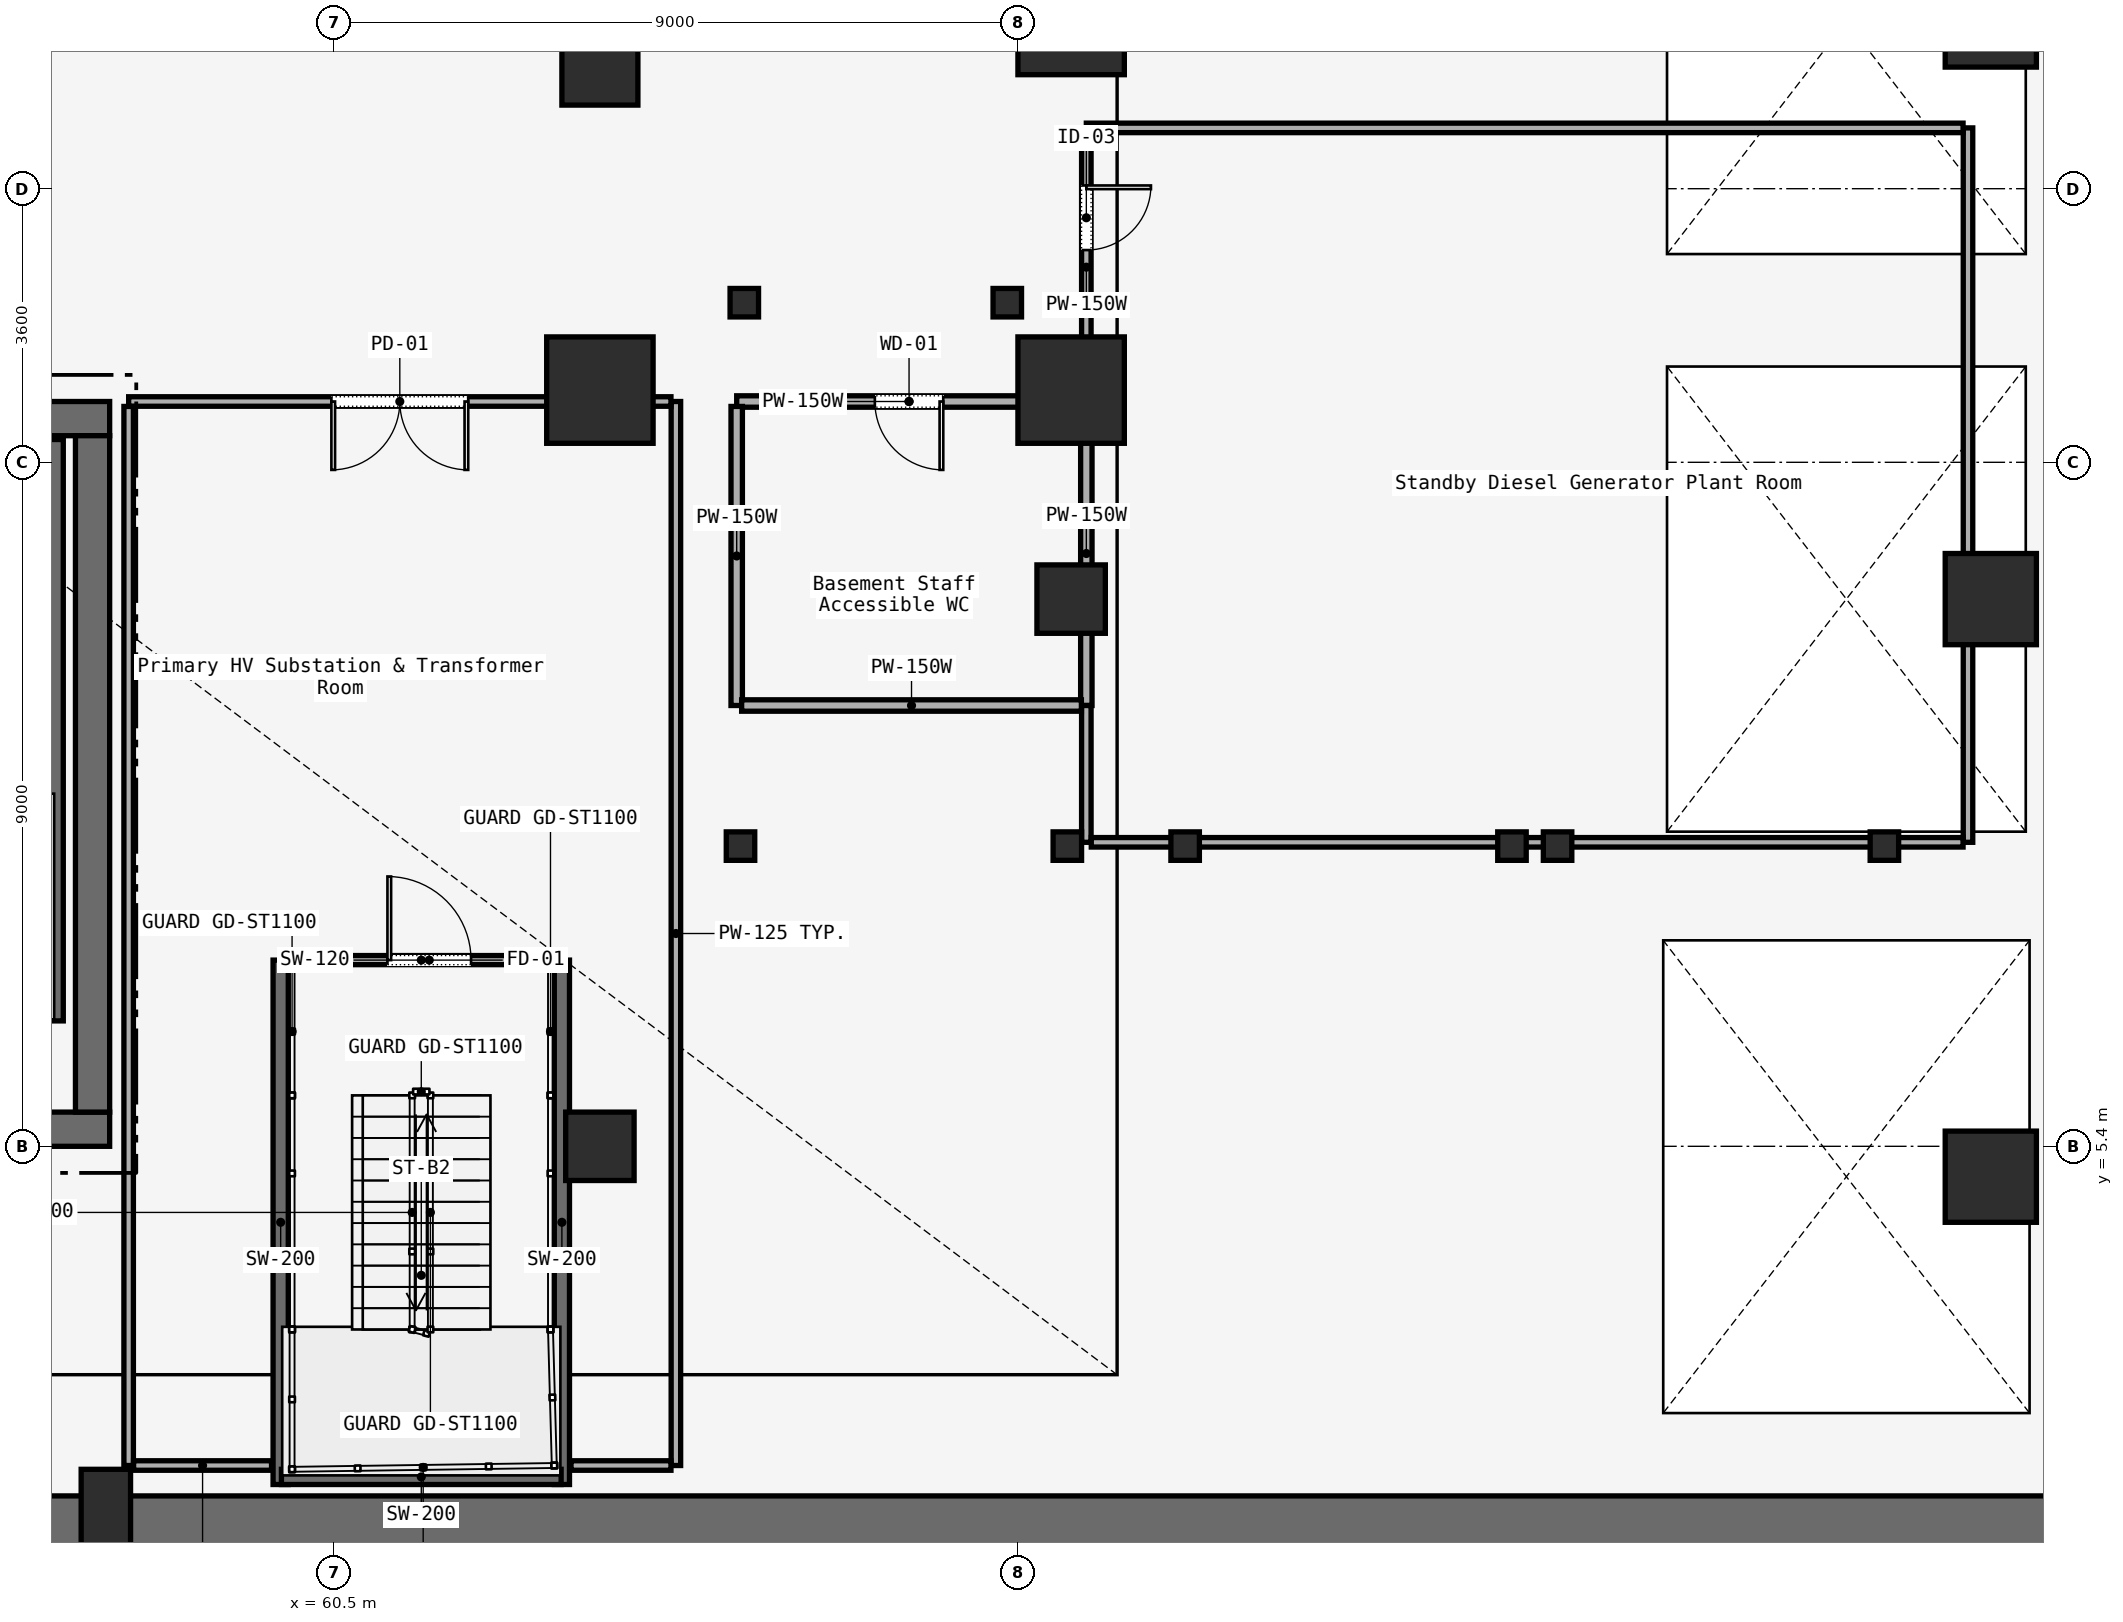
"""IFC4 building model, lengths in metres.
Left out: names, types, materials, properties, quantities, classifications, styles, units other than length and angle.
Written with IfcOpenShell. Run it as: python <this file> out.ifc"""

import sys

from ifc_helpers import new_model, si_unit, direction, frame, frame_2d, origin, origin_2d, place, context, subcontext, project, spatial, rectangle, i_section, extrude, element, fill, save


model = new_model("IFC4")
c1 = context("Model", 3, precision=1e-05, world=origin(), true_north=direction((0.0, 1.0)))
c2 = subcontext(c1, "Body", "Model", "MODEL_VIEW")
j1 = project(units=[si_unit("LENGTHUNIT", "METRE"), si_unit("PLANEANGLEUNIT", "RADIAN")], contexts=[c1])
p1 = place(None, origin())
s1 = spatial("IfcSite", under=j1, at=p1, CompositionType="ELEMENT")
p2 = place(p1, origin())
s2 = spatial("IfcBuilding", under=s1, at=p2, CompositionType="ELEMENT")
p3 = place(p2, frame((0.0, 0.0, -9.0)))
s3 = spatial("IfcBuildingStorey", under=s2, at=p3, CompositionType="ELEMENT", Elevation=-9.0)
p4 = place(p3, frame((0.0, 0.4, 0.0), z_axis=(0.0, 0.0, 1.0), x_axis=(1.0, 0.0, 0.0)))
e1 = element("IfcWall", 1, at=p4, inside=s3, PredefinedType="USERDEFINED", context=c2, shape_type="SweptSolid", body=[
    extrude(rectangle(XDim=84.0, YDim=0.8, at=frame_2d((42.0, 0.0))), origin(), (0.0, 0.0, 1.0), 4.15),
])
p5 = place(p3, frame((26.45, 14.975, 0.0), z_axis=(0.0, 0.0, 1.0), x_axis=(1.0, 0.0, 0.0)))
e2 = element("IfcWall", 2, at=p5, inside=s3, PredefinedType="SOLIDWALL", context=c2, shape_type="SweptSolid", body=[
    extrude(rectangle(XDim=31.1, YDim=0.45, at=frame_2d((15.55, 0.0))), origin(), (0.0, 0.0, 1.0), 4.15),
])
p6 = place(p5, frame((1.65, 0.0, 0.0)))
e3 = element("IfcOpeningElement", 3, at=p6, cuts=e2, PredefinedType="OPENING", context=c2, shape_type="SweptSolid", body=[
    extrude(rectangle(XDim=1.1, YDim=2.2, at=frame_2d((0.55, 1.1))), frame((0.0, 0.225, 0.0), z_axis=(0.0, -1.0, 0.0), x_axis=(1.0, 0.0, 0.0)), (0.0, 0.0, 1.0), 0.45),
])
p7 = place(p5, frame((13.65, 0.0, 0.0)))
e4 = element("IfcOpeningElement", 4, at=p7, cuts=e2, PredefinedType="OPENING", context=c2, shape_type="SweptSolid", body=[
    extrude(rectangle(XDim=1.1, YDim=2.2, at=frame_2d((0.55, 1.1))), frame((0.0, 0.225, 0.0), z_axis=(0.0, -1.0, 0.0), x_axis=(1.0, 0.0, 0.0)), (0.0, 0.0, 1.0), 0.45),
])
p8 = place(p5, frame((25.55, 0.0, 0.0)))
e5 = element("IfcOpeningElement", 5, at=p8, cuts=e2, PredefinedType="OPENING", context=c2, shape_type="SweptSolid", body=[
    extrude(rectangle(XDim=1.1, YDim=2.2, at=frame_2d((0.55, 1.1))), frame((0.0, 0.225, 0.0), z_axis=(0.0, -1.0, 0.0), x_axis=(1.0, 0.0, 0.0)), (0.0, 0.0, 1.0), 0.45),
])
p9 = place(p5, frame((10.7, 0.0, 0.0)))
e6 = element("IfcOpeningElement", 6, at=p9, cuts=e2, PredefinedType="OPENING", context=c2, shape_type="SweptSolid", body=[
    extrude(rectangle(XDim=1.4, YDim=2.2, at=frame_2d((0.7, 1.1))), frame((0.0, 0.225, 0.0), z_axis=(0.0, -1.0, 0.0), x_axis=(1.0, 0.0, 0.0)), (0.0, 0.0, 1.0), 0.45),
])
p10 = place(p5, frame((19.35, 0.0, 0.0)))
e7 = element("IfcOpeningElement", 7, at=p10, cuts=e2, PredefinedType="OPENING", context=c2, shape_type="SweptSolid", body=[
    extrude(rectangle(XDim=1.1, YDim=2.2, at=frame_2d((0.55, 1.1))), frame((0.0, 0.225, 0.0), z_axis=(0.0, -1.0, 0.0), x_axis=(1.0, 0.0, 0.0)), (0.0, 0.0, 1.0), 0.45),
])
p11 = place(p5, frame((21.4, 0.0, 0.0)))
e8 = element("IfcOpeningElement", 8, at=p11, cuts=e2, PredefinedType="OPENING", context=c2, shape_type="SweptSolid", body=[
    extrude(rectangle(XDim=0.9, YDim=2.1, at=frame_2d((0.45, 1.05))), frame((0.0, 0.225, 0.0), z_axis=(0.0, -1.0, 0.0), x_axis=(1.0, 0.0, 0.0)), (0.0, 0.0, 1.0), 0.45),
])
p12 = place(p5, frame((23.35, 0.0, 0.0)))
e9 = element("IfcOpeningElement", 9, at=p12, cuts=e2, PredefinedType="OPENING", context=c2, shape_type="SweptSolid", body=[
    extrude(rectangle(XDim=1.3, YDim=2.3, at=frame_2d((0.65, 1.15))), frame((0.0, 0.225, 0.0), z_axis=(0.0, -1.0, 0.0), x_axis=(1.0, 0.0, 0.0)), (0.0, 0.0, 1.0), 0.45),
])
p13 = place(p3, frame((26.45, 5.625, 0.0), z_axis=(0.0, 0.0, 1.0), x_axis=(1.0, 0.0, 0.0)))
e10 = element("IfcWall", 10, at=p13, inside=s3, PredefinedType="SOLIDWALL", context=c2, shape_type="SweptSolid", body=[
    extrude(rectangle(XDim=31.1, YDim=0.45, at=frame_2d((15.55, 0.0))), origin(), (0.0, 0.0, 1.0), 4.15),
])
p14 = place(p3, frame((57.325, 5.85, 0.0), z_axis=(0.0, 0.0, 1.0), x_axis=(0.0, 1.0, 0.0)))
e11 = element("IfcWall", 11, at=p14, inside=s3, PredefinedType="SOLIDWALL", context=c2, shape_type="SweptSolid", body=[
    extrude(rectangle(XDim=8.9, YDim=0.45, at=frame_2d((4.45, 0.0))), origin(), (0.0, 0.0, 1.0), 4.15),
])
for number, where, z_axis, x_axis in (
    (12, (82.3, 5.0, 0.0), (0.0, 0.0, 1.0), (1.0, 0.0, 0.0)),
    (13, (82.3, 12.6, 0.0), (0.0, 0.0, 1.0), (1.0, 0.0, 0.0)),
    (14, (82.3, 20.2, 0.0), (0.0, 0.0, 1.0), (1.0, 0.0, 0.0)),
):
    element("IfcColumn", number, at=place(p3, frame(where, z_axis=z_axis, x_axis=x_axis)), inside=s3, PredefinedType="COLUMN", context=c2, shape_type="SweptSolid", body=[
        extrude(rectangle(XDim=1.2, YDim=1.2, at=origin_2d()), origin(), (0.0, 0.0, 1.0), 4.15),
    ])
for number, where, z_axis, x_axis in (
    (15, (70.2, 15.35, 0.0), (0.0, 0.0, 1.0), (1.0, 0.0, 0.0)),
    (16, (70.2, 20.2, 0.0), (0.0, 0.0, 1.0), (1.0, 0.0, 0.0)),
    (17, (64.0, 15.35, 0.0), (0.0, 0.0, 1.0), (1.0, 0.0, 0.0)),
):
    element("IfcColumn", number, at=place(p3, frame(where, z_axis=z_axis, x_axis=x_axis)), inside=s3, PredefinedType="COLUMN", context=c2, shape_type="SweptSolid", body=[
        extrude(rectangle(XDim=1.4, YDim=1.4, at=origin_2d()), origin(), (0.0, 0.0, 1.0), 4.15),
    ])
p15 = place(p3, frame((57.5, 0.55, 0.0), z_axis=(0.0, 0.0, 1.0), x_axis=(1.0, 0.0, 0.0)))
e18 = element("IfcColumn", 18, at=p15, inside=s3, PredefinedType="PILASTER", context=c2, shape_type="SweptSolid", body=[
    extrude(rectangle(XDim=0.65, YDim=1.2, at=origin_2d()), origin(), (0.0, 0.0, 1.0), 4.15),
])
for number, where, z_axis, x_axis in (
    (19, (70.2, 12.6, 0.0), (0.0, 0.0, 1.0), (1.0, 0.0, 0.0)),
    (20, (64.0, 5.4, 0.0), (0.0, 0.0, 1.0), (1.0, 0.0, 0.0)),
):
    element("IfcColumn", number, at=place(p3, frame(where, z_axis=z_axis, x_axis=x_axis)), inside=s3, PredefinedType="COLUMN", context=c2, shape_type="SweptSolid", body=[
        extrude(rectangle(XDim=0.9, YDim=0.9, at=origin_2d()), origin(), (0.0, 0.0, 1.0), 4.15),
    ])
p16 = place(p3, frame((64.0, 19.6, 0.0), z_axis=(0.0, 0.0, 1.0), x_axis=(1.0, 0.0, 0.0)))
e21 = element("IfcColumn", 21, at=p16, inside=s3, PredefinedType="COLUMN", context=c2, shape_type="SweptSolid", body=[
    extrude(rectangle(XDim=1.0, YDim=1.0, at=origin_2d()), origin(), (0.0, 0.0, 1.0), 4.15),
])
for number, where, z_axis, x_axis in (
    (22, (65.85, 9.35, 0.0), (0.0, 0.0, 1.0), (1.0, 0.0, 0.0)),
    (23, (70.15, 9.35, 0.0), (0.0, 0.0, 1.0), (1.0, 0.0, 0.0)),
    (24, (71.7, 9.35, 0.0), (0.0, 0.0, 1.0), (1.0, 0.0, 0.0)),
    (25, (76.0, 9.35, 0.0), (0.0, 0.0, 1.0), (1.0, 0.0, 0.0)),
    (26, (76.6, 9.35, 0.0), (0.0, 0.0, 1.0), (1.0, 0.0, 0.0)),
    (27, (80.9, 9.35, 0.0), (0.0, 0.0, 1.0), (1.0, 0.0, 0.0)),
    (28, (65.9, 16.5, 0.0), (0.0, 0.0, 1.0), (1.0, 0.0, 0.0)),
    (29, (69.36, 16.5, 0.0), (0.0, 0.0, 1.0), (1.0, 0.0, 0.0)),
):
    element("IfcColumn", number, at=place(p3, frame(where, z_axis=z_axis, x_axis=x_axis)), inside=s3, PredefinedType="COLUMN", context=c2, shape_type="SweptSolid", body=[
        extrude(i_section(OverallWidth=0.375, OverallDepth=0.375, WebThickness=0.017, FlangeThickness=0.027, FilletRadius=0.015, at=origin_2d()), origin(), (0.0, 0.0, 1.0), 4.5),
    ])
p17 = place(p3, frame((56.84, 14.7, 0.0), z_axis=(0.0, 0.0, 1.0), x_axis=(0.0, -1.0, 0.0)))
e30 = element("IfcWall", 30, at=p17, inside=s3, PredefinedType="SOLIDWALL", context=c2, shape_type="SweptSolid", body=[
    extrude(rectangle(XDim=7.65, YDim=0.2, at=frame_2d((3.825, 0.0))), origin(), (0.0, 0.0, 1.0), 4.5),
])
for number, where, z_axis, x_axis in (
    (31, (59.8, 7.85, 0.0), (0.0, 0.0, 1.0), (0.0, -1.0, 0.0)),
    (32, (63.5, 7.85, 0.0), (0.0, 0.0, 1.0), (0.0, -1.0, 0.0)),
):
    element("IfcWall", number, at=place(p3, frame(where, z_axis=z_axis, x_axis=x_axis)), inside=s3, PredefinedType="SOLIDWALL", context=c2, shape_type="SweptSolid", body=[
        extrude(rectangle(XDim=6.9, YDim=0.2, at=frame_2d((3.45, 0.0))), origin(), (0.0, 0.0, 1.0), 4.5),
    ])
p18 = place(p3, frame((59.81, 1.05, 0.0), z_axis=(0.0, 0.0, 1.0), x_axis=(1.0, 0.0, 0.0)))
e33 = element("IfcWall", 33, at=p18, inside=s3, PredefinedType="SOLIDWALL", context=c2, shape_type="SweptSolid", body=[
    extrude(rectangle(XDim=3.68, YDim=0.2, at=frame_2d((1.84, 0.0))), origin(), (0.0, 0.0, 1.0), 4.5),
])
p19 = place(p3, frame((59.905, 7.85, 0.0), z_axis=(0.0, 0.0, 1.0), x_axis=(1.0, 0.0, 0.0)))
e34 = element("IfcWall", 34, at=p19, inside=s3, PredefinedType="SOLIDWALL", context=c2, shape_type="SweptSolid", body=[
    extrude(rectangle(XDim=3.49, YDim=0.12, at=frame_2d((1.745, 0.0))), origin(), (0.0, 0.0, 1.0), 3.193),
])
p20 = place(p19, frame((1.3, 0.0, 0.0)))
e35 = element("IfcOpeningElement", 35, at=p20, cuts=e34, PredefinedType="OPENING", context=c2, shape_type="SweptSolid", body=[
    extrude(rectangle(XDim=1.1, YDim=2.2, at=frame_2d((0.55, 1.1))), frame((0.0, 0.06, 0.0), z_axis=(0.0, -1.0, 0.0), x_axis=(1.0, 0.0, 0.0)), (0.0, 0.0, 1.0), 0.12),
])
p21 = place(p3, frame((65.0, 1.2, 0.0), z_axis=(0.0, 0.0, 1.0), x_axis=(0.0, 1.0, 0.0)))
e36 = element("IfcWall", 36, at=p21, inside=s3, PredefinedType="PARTITIONING", context=c2, shape_type="SweptSolid", body=[
    extrude(rectangle(XDim=14.0, YDim=0.125, at=frame_2d((7.0, 0.0))), origin(), (0.0, 0.0, 1.0), 3.193),
])
p22 = place(p3, frame((64.935, 15.2, 0.0), z_axis=(0.0, 0.0, 1.0), x_axis=(-1.0, 0.0, 0.0)))
e37 = element("IfcWall", 37, at=p22, inside=s3, PredefinedType="PARTITIONING", context=c2, shape_type="SweptSolid", body=[
    extrude(rectangle(XDim=7.135, YDim=0.125, at=frame_2d((3.567, 0.0))), origin(), (0.0, 0.0, 1.0), 3.193),
])
p23 = place(p22, frame((2.667, 0.0, 0.0)))
e38 = element("IfcOpeningElement", 38, at=p23, cuts=e37, PredefinedType="OPENING", context=c2, shape_type="SweptSolid", body=[
    extrude(rectangle(XDim=1.8, YDim=2.3, at=frame_2d((0.9, 1.15))), frame((0.0, 0.062, 0.0), z_axis=(0.0, -1.0, 0.0), x_axis=(1.0, 0.0, 0.0)), (0.0, 0.0, 1.0), 0.125),
])
p24 = place(p3, frame((57.8, 15.135, 0.0), z_axis=(0.0, 0.0, 1.0), x_axis=(0.0, -1.0, 0.0)))
e39 = element("IfcWall", 39, at=p24, inside=s3, PredefinedType="PARTITIONING", context=c2, shape_type="SweptSolid", body=[
    extrude(rectangle(XDim=13.935, YDim=0.125, at=frame_2d((6.968, 0.0))), origin(), (0.0, 0.0, 1.0), 3.193),
])
p25 = place(p3, frame((57.865, 1.2, 0.0), z_axis=(0.0, 0.0, 1.0), x_axis=(1.0, 0.0, 0.0)))
e40 = element("IfcWall", 40, at=p25, inside=s3, PredefinedType="PARTITIONING", context=c2, shape_type="SweptSolid", body=[
    extrude(rectangle(XDim=1.815, YDim=0.125, at=frame_2d((0.907, 0.0))), origin(), (0.0, 0.0, 1.0), 3.193),
])
p26 = place(p3, frame((63.62, 1.2, 0.0), z_axis=(0.0, 0.0, 1.0), x_axis=(1.0, 0.0, 0.0)))
e41 = element("IfcWall", 41, at=p26, inside=s3, PredefinedType="PARTITIONING", context=c2, shape_type="SweptSolid", body=[
    extrude(rectangle(XDim=1.315, YDim=0.125, at=frame_2d((0.657, 0.0))), origin(), (0.0, 0.0, 1.0), 3.193),
])
p27 = place(p3, frame((82.0, 9.4, 0.0), z_axis=(0.0, 0.0, 1.0), x_axis=(0.0, 1.0, 0.0)))
e42 = element("IfcWall", 42, at=p27, inside=s3, PredefinedType="PARTITIONING", context=c2, shape_type="SweptSolid", body=[
    extrude(rectangle(XDim=9.4, YDim=0.125, at=frame_2d((4.7, 0.0))), origin(), (0.0, 0.0, 1.0), 3.193),
])
p28 = place(p3, frame((81.935, 18.8, 0.0), z_axis=(0.0, 0.0, 1.0), x_axis=(-1.0, 0.0, 0.0)))
e43 = element("IfcWall", 43, at=p28, inside=s3, PredefinedType="PARTITIONING", context=c2, shape_type="SweptSolid", body=[
    extrude(rectangle(XDim=11.535, YDim=0.125, at=frame_2d((5.768, 0.0))), origin(), (0.0, 0.0, 1.0), 3.193),
])
p29 = place(p3, frame((70.4, 18.735, 0.0), z_axis=(0.0, 0.0, 1.0), x_axis=(0.0, -1.0, 0.0)))
e44 = element("IfcWall", 44, at=p29, inside=s3, PredefinedType="PARTITIONING", context=c2, shape_type="SweptSolid", body=[
    extrude(rectangle(XDim=3.535, YDim=0.125, at=frame_2d((1.768, 0.0))), origin(), (0.0, 0.0, 1.0), 3.193),
])
p30 = place(p29, frame((0.692, 0.0, 0.0)))
e45 = element("IfcOpeningElement", 45, at=p30, cuts=e44, PredefinedType="OPENING", context=c2, shape_type="SweptSolid", body=[
    extrude(rectangle(XDim=0.85, YDim=2.15, at=frame_2d((0.425, 1.075))), frame((0.0, 0.062, 0.0), z_axis=(0.0, -1.0, 0.0), x_axis=(1.0, 0.0, 0.0)), (0.0, 0.0, 1.0), 0.125),
])
p31 = place(p3, frame((70.4, 15.2, 0.0), z_axis=(0.0, 0.0, 1.0), x_axis=(0.0, -1.0, 0.0)))
e46 = element("IfcWall", 46, at=p31, inside=s3, PredefinedType="PARTITIONING", context=c2, shape_type="SweptSolid", body=[
    extrude(rectangle(XDim=4.0, YDim=0.15, at=frame_2d((2.0, 0.0))), origin(), (0.0, 0.0, 1.0), 3.193),
])
p32 = place(p3, frame((70.4, 11.2, 0.0), z_axis=(0.0, 0.0, 1.0), x_axis=(0.0, -1.0, 0.0)))
e47 = element("IfcWall", 47, at=p32, inside=s3, PredefinedType="PARTITIONING", context=c2, shape_type="SweptSolid", body=[
    extrude(rectangle(XDim=1.8, YDim=0.125, at=frame_2d((0.9, 0.0))), origin(), (0.0, 0.0, 1.0), 3.193),
])
p33 = place(p3, frame((70.465, 9.4, 0.0), z_axis=(0.0, 0.0, 1.0), x_axis=(1.0, 0.0, 0.0)))
e48 = element("IfcWall", 48, at=p33, inside=s3, PredefinedType="PARTITIONING", context=c2, shape_type="SweptSolid", body=[
    extrude(rectangle(XDim=11.47, YDim=0.125, at=frame_2d((5.735, 0.0))), origin(), (0.0, 0.0, 1.0), 3.193),
])
p34 = place(p3, frame((70.335, 15.2, 0.0), z_axis=(0.0, 0.0, 1.0), x_axis=(-1.0, 0.0, 0.0)))
e49 = element("IfcWall", 49, at=p34, inside=s3, PredefinedType="PARTITIONING", context=c2, shape_type="SweptSolid", body=[
    extrude(rectangle(XDim=4.535, YDim=0.15, at=frame_2d((2.268, 0.0))), origin(), (0.0, 0.0, 1.0), 3.193),
])
p35 = place(p34, frame((1.817, 0.0, 0.0)))
e50 = element("IfcOpeningElement", 50, at=p35, cuts=e49, PredefinedType="OPENING", context=c2, shape_type="SweptSolid", body=[
    extrude(rectangle(XDim=0.9, YDim=2.15, at=frame_2d((0.45, 1.075))), frame((0.0, 0.075, 0.0), z_axis=(0.0, -1.0, 0.0), x_axis=(1.0, 0.0, 0.0)), (0.0, 0.0, 1.0), 0.15),
])
p36 = place(p3, frame((65.8, 15.135, 0.0), z_axis=(0.0, 0.0, 1.0), x_axis=(0.0, -1.0, 0.0)))
e51 = element("IfcWall", 51, at=p36, inside=s3, PredefinedType="PARTITIONING", context=c2, shape_type="SweptSolid", body=[
    extrude(rectangle(XDim=3.935, YDim=0.15, at=frame_2d((1.968, 0.0))), origin(), (0.0, 0.0, 1.0), 3.193),
])
p37 = place(p3, frame((65.865, 11.2, 0.0), z_axis=(0.0, 0.0, 1.0), x_axis=(1.0, 0.0, 0.0)))
e52 = element("IfcWall", 52, at=p37, inside=s3, PredefinedType="PARTITIONING", context=c2, shape_type="SweptSolid", body=[
    extrude(rectangle(XDim=4.47, YDim=0.15, at=frame_2d((2.235, 0.0))), origin(), (0.0, 0.0, 1.0), 3.193),
])
p38 = place(p20, origin())
e53 = element("IfcDoor", 53, at=p38, inside=s3, OperationType="SINGLE_SWING_LEFT", PredefinedType="DOOR", context=c2, shape_type="SweptSolid", body=[
    extrude(rectangle(XDim=1.1, YDim=2.2, at=frame_2d((0.55, 1.1))), frame((0.0, 0.025, 0.0), z_axis=(0.0, -1.0, 0.0), x_axis=(1.0, 0.0, 0.0)), (0.0, 0.0, 1.0), 0.05),
])
fill(e35, e53)
p39 = place(p23, origin())
e54 = element("IfcDoor", 54, at=p39, inside=s3, OperationType="SINGLE_SWING_LEFT", PredefinedType="DOOR", context=c2, shape_type="SweptSolid", body=[
    extrude(rectangle(XDim=1.8, YDim=2.3, at=frame_2d((0.9, 1.15))), frame((0.0, 0.025, 0.0), z_axis=(0.0, -1.0, 0.0), x_axis=(1.0, 0.0, 0.0)), (0.0, 0.0, 1.0), 0.05),
])
fill(e38, e54)
p40 = place(p30, origin())
e55 = element("IfcDoor", 55, at=p40, inside=s3, OperationType="SINGLE_SWING_LEFT", PredefinedType="DOOR", context=c2, shape_type="SweptSolid", body=[
    extrude(rectangle(XDim=0.85, YDim=2.15, at=frame_2d((0.425, 1.075))), frame((0.0, 0.025, 0.0), z_axis=(0.0, -1.0, 0.0), x_axis=(1.0, 0.0, 0.0)), (0.0, 0.0, 1.0), 0.05),
])
fill(e45, e55)
p41 = place(p35, origin())
e56 = element("IfcDoor", 56, at=p41, inside=s3, OperationType="SINGLE_SWING_LEFT", PredefinedType="DOOR", context=c2, shape_type="SweptSolid", body=[
    extrude(rectangle(XDim=0.9, YDim=2.15, at=frame_2d((0.45, 1.075))), frame((0.0, 0.025, 0.0), z_axis=(0.0, -1.0, 0.0), x_axis=(1.0, 0.0, 0.0)), (0.0, 0.0, 1.0), 0.05),
])
fill(e50, e56)
save(model, sys.argv[1])
